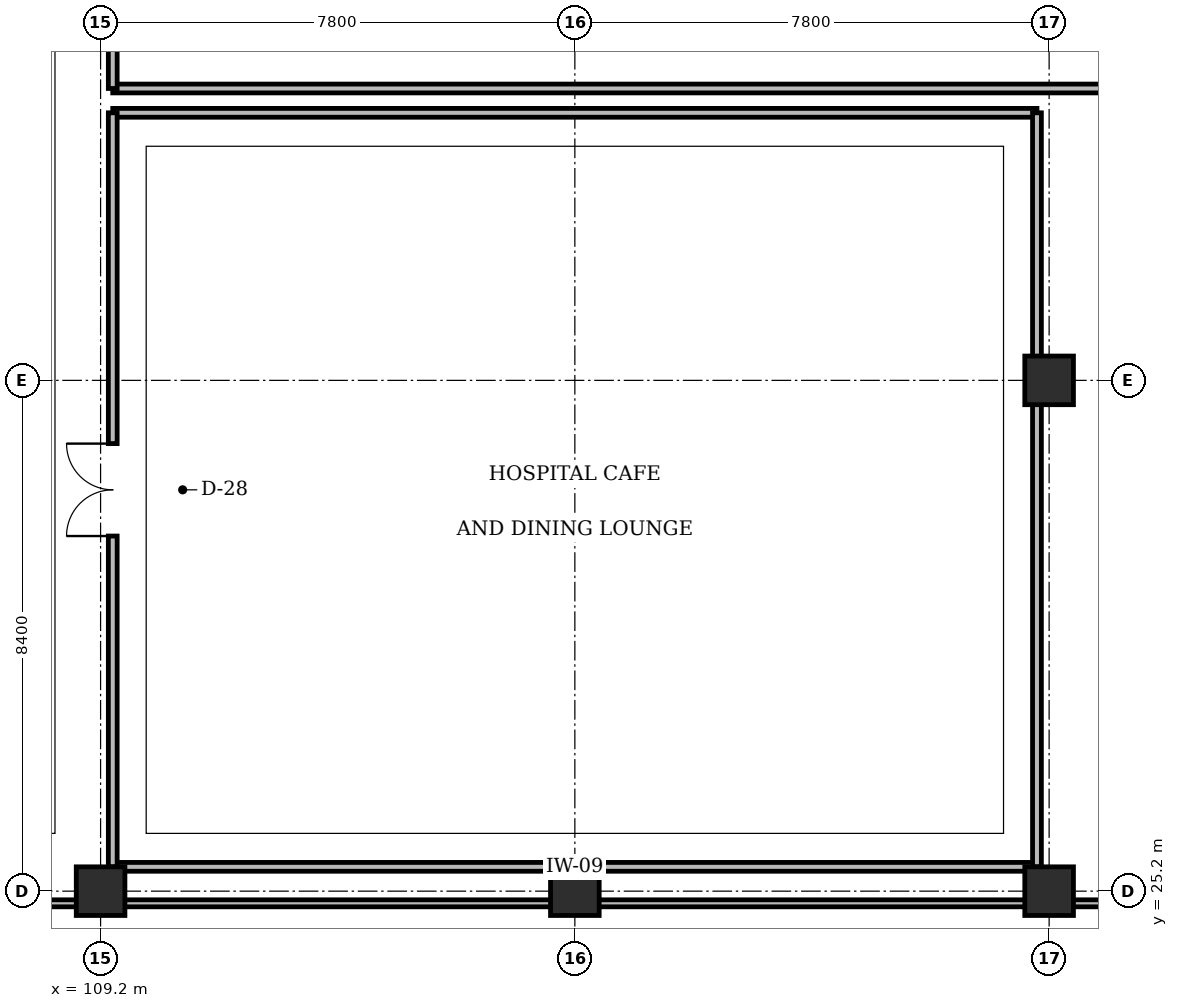
"""IFC4 building model, lengths in metres.
Left out: names, types, materials, properties, quantities, classifications, styles, units other than length and angle.
Written with IfcOpenShell. Run it as: python <this file> out.ifc"""

import sys

from ifc_helpers import new_model, si_unit, direction, frame, frame_2d, origin, origin_2d, place, context, subcontext, project, spatial, rectangle, extrude, element, fill, save


model = new_model("IFC4")
c1 = context("Model", 3, precision=1e-05, world=origin(), true_north=direction((0.0, 1.0)))
c2 = subcontext(c1, "Body", "Model", "MODEL_VIEW")
j1 = project(units=[si_unit("LENGTHUNIT", "METRE"), si_unit("PLANEANGLEUNIT", "RADIAN")], contexts=[c1])
p1 = place(None, origin())
s1 = spatial("IfcSite", under=j1, at=p1, CompositionType="ELEMENT")
p2 = place(p1, origin())
s2 = spatial("IfcBuilding", under=s1, at=p2, CompositionType="ELEMENT")
p3 = place(p2, origin())
s3 = spatial("IfcBuildingStorey", under=s2, at=p3, CompositionType="ELEMENT", Elevation=0.0)
for number, where, z_axis, x_axis in (
    (1, (109.2, 25.2, 0.0), (0.0, 0.0, 1.0), (1.0, 0.0, 0.0)),
    (2, (117.0, 25.2, 0.0), (0.0, 0.0, 1.0), (1.0, 0.0, 0.0)),
    (3, (124.8, 25.2, 0.0), (0.0, 0.0, 1.0), (1.0, 0.0, 0.0)),
    (4, (124.8, 33.6, 0.0), (0.0, 0.0, 1.0), (1.0, 0.0, 0.0)),
):
    element("IfcColumn", number, at=place(p3, frame(where, z_axis=z_axis, x_axis=x_axis)), inside=s3, PredefinedType="COLUMN", context=c2, shape_type="SweptSolid", body=[
        extrude(rectangle(XDim=0.8, YDim=0.8, at=origin_2d()), origin(), (0.0, 0.0, 1.0), 4.8),
    ])
p4 = place(p3, frame((109.4, 25.6, 0.0), z_axis=(0.0, 0.0, 1.0), x_axis=(1.0, 0.0, 0.0)))
e5 = element("IfcWall", 5, at=p4, inside=s3, PredefinedType="PARTITIONING", context=c2, shape_type="SweptSolid", body=[
    extrude(rectangle(XDim=15.2, YDim=0.145, at=frame_2d((7.6, 0.0))), origin(), (0.0, 0.0, 1.0), 3.63),
])
p5 = place(p3, frame((109.4, 38.0, 0.0), z_axis=(0.0, 0.0, 1.0), x_axis=(1.0, 0.0, 0.0)))
e6 = element("IfcWall", 6, at=p5, inside=s3, PredefinedType="PARTITIONING", context=c2, shape_type="SweptSolid", body=[
    extrude(rectangle(XDim=15.2, YDim=0.145, at=frame_2d((7.6, 0.0))), origin(), (0.0, 0.0, 1.0), 4.46),
])
p6 = place(p3, frame((109.4, 25.6, 0.0), z_axis=(0.0, 0.0, 1.0), x_axis=(0.0, 1.0, 0.0)))
e7 = element("IfcWall", 7, at=p6, inside=s3, PredefinedType="PARTITIONING", context=c2, shape_type="SweptSolid", body=[
    extrude(rectangle(XDim=12.4, YDim=0.145, at=frame_2d((6.2, 0.0))), origin(), (0.0, 0.0, 1.0), 3.63),
])
p7 = place(p6, frame((5.44, 0.0, 0.0)))
e8 = element("IfcOpeningElement", 8, at=p7, cuts=e7, PredefinedType="OPENING", context=c2, shape_type="SweptSolid", body=[
    extrude(rectangle(XDim=1.52, YDim=2.2, at=frame_2d((0.76, 1.1))), frame((0.0, 0.083, 0.0), z_axis=(0.0, -1.0, 0.0), x_axis=(1.0, 0.0, 0.0)), (0.0, 0.0, 1.0), 0.165),
])
p8 = place(p3, frame((124.6, 25.6, 0.0), z_axis=(0.0, 0.0, 1.0), x_axis=(0.0, 1.0, 0.0)))
e9 = element("IfcWall", 9, at=p8, inside=s3, PredefinedType="PARTITIONING", context=c2, shape_type="SweptSolid", body=[
    extrude(rectangle(XDim=12.4, YDim=0.145, at=frame_2d((6.2, 0.0))), origin(), (0.0, 0.0, 1.0), 3.615),
])
p9 = place(p3, frame((109.4, 38.4, 0.0), z_axis=(0.0, 0.0, 1.0), x_axis=(1.0, 0.0, 0.0)))
e10 = element("IfcWall", 10, at=p9, inside=s3, PredefinedType="PARTITIONING", context=c2, shape_type="SweptSolid", body=[
    extrude(rectangle(XDim=22.8, YDim=0.145, at=frame_2d((11.4, 0.0))), origin(), (0.0, 0.0, 1.0), 4.46),
])
p10 = place(p3, frame((109.4, 38.4, 0.0), z_axis=(0.0, 0.0, 1.0), x_axis=(0.0, 1.0, 0.0)))
e11 = element("IfcWall", 11, at=p10, inside=s3, PredefinedType="PARTITIONING", context=c2, shape_type="SweptSolid", body=[
    extrude(rectangle(XDim=11.6, YDim=0.145, at=frame_2d((5.8, 0.0))), origin(), (0.0, 0.0, 1.0), 3.63),
])
p11 = place(p10, frame((5.04, 0.0, 0.0)))
e12 = element("IfcOpeningElement", 12, at=p11, cuts=e11, PredefinedType="OPENING", context=c2, shape_type="SweptSolid", body=[
    extrude(rectangle(XDim=1.52, YDim=2.2, at=frame_2d((0.76, 1.1))), frame((0.0, 0.083, 0.0), z_axis=(0.0, -1.0, 0.0), x_axis=(1.0, 0.0, 0.0)), (0.0, 0.0, 1.0), 0.165),
])
p12 = place(p3, frame((70.76, 25.0, 0.0), z_axis=(0.0, 0.0, 1.0), x_axis=(1.0, 0.0, 0.0)))
e13 = element("IfcWall", 13, at=p12, inside=s3, PredefinedType="PARTITIONING", context=c2, shape_type="SweptSolid", body=[
    extrude(rectangle(XDim=61.44, YDim=0.115, at=frame_2d((30.72, 0.0))), origin(), (0.0, 0.0, 1.0), 3.63),
])
p13 = place(p7, origin())
e14 = element("IfcDoor", 14, at=p13, inside=s3, OperationType="DOUBLE_DOOR_SINGLE_SWING", PredefinedType="DOOR", context=c2, shape_type="SweptSolid", body=[
    extrude(rectangle(XDim=1.52, YDim=2.2, at=frame_2d((0.76, 1.1))), frame((0.0, 0.025, 0.0), z_axis=(0.0, -1.0, 0.0), x_axis=(1.0, 0.0, 0.0)), (0.0, 0.0, 1.0), 0.05),
])
fill(e8, e14)
save(model, sys.argv[1])
